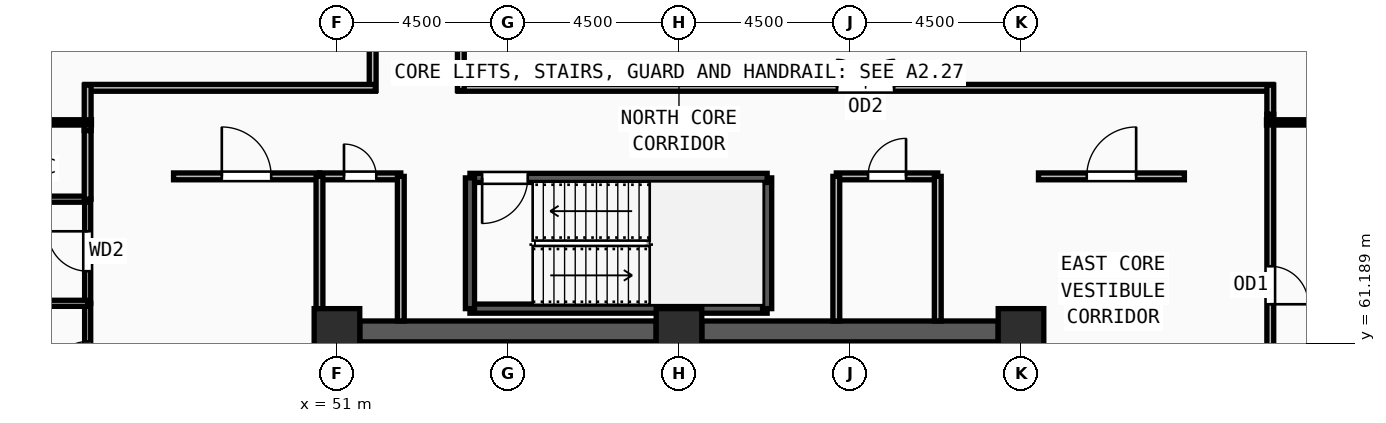
"""IFC4 building model, lengths in metres.
Left out: names, types, materials, properties, quantities, classifications, styles, units other than length and angle.
Written with IfcOpenShell. Run it as: python <this file> out.ifc"""

import sys

from ifc_helpers import new_model, si_unit, direction, frame, frame_2d, origin, origin_2d, place, context, subcontext, project, spatial, rectangle, extrude, source, transform, mapped, element, fill, save


model = new_model("IFC4")
c1 = context("Model", 3, precision=1e-05, world=origin(), true_north=direction((0.0, 1.0)))
c2 = subcontext(c1, "Body", "Model", "MODEL_VIEW")
j1 = project(units=[si_unit("LENGTHUNIT", "METRE"), si_unit("PLANEANGLEUNIT", "RADIAN")], contexts=[c1])
p1 = place(None, origin())
s1 = spatial("IfcSite", under=j1, at=p1, CompositionType="ELEMENT")
p2 = place(p1, origin())
s2 = spatial("IfcBuilding", under=s1, at=p2, CompositionType="ELEMENT")
p3 = place(p2, frame((0.0, 0.0, 309.0)))
s3 = spatial("IfcBuildingStorey", under=s2, at=p3, CompositionType="ELEMENT", Elevation=309.0)
m1 = source(origin(), c2, "Body", "SweptSolid", [
    extrude(rectangle(XDim=1.2, YDim=1.2, at=origin_2d()), origin(), (0.0, 0.0, 1.0), 3.75),
])
for number, where, z_axis, x_axis in (
    (1, (69.0, 61.5, 0.0), (0.0, 0.0, 1.0), (1.0, 0.0, 0.0)),
    (2, (60.0, 61.5, 0.0), (0.0, 0.0, 1.0), (1.0, 0.0, 0.0)),
    (3, (51.0, 61.5, 0.0), (0.0, 0.0, 1.0), (1.0, 0.0, 0.0)),
):
    element("IfcColumn", number, at=place(p3, frame(where, z_axis=z_axis, x_axis=x_axis)), inside=s3, PredefinedType="COLUMN", context=c2, shape_type="MappedRepresentation", body=[
        mapped(m1, transform((0.0, 0.0, 0.0), x_axis=(1.0, 0.0, 0.0), y_axis=(0.0, 1.0, 0.0), z_axis=(0.0, 0.0, 1.0), scale=1.0)),
    ])
for number, where, z_axis, x_axis in (
    (4, (51.6, 61.5, 0.0), (0.0, 0.0, 1.0), (1.0, 0.0, 0.0)),
    (5, (60.6, 61.5, 0.0), (0.0, 0.0, 1.0), (1.0, 0.0, 0.0)),
):
    element("IfcWall", number, at=place(p3, frame(where, z_axis=z_axis, x_axis=x_axis)), inside=s3, PredefinedType="SHEAR", context=c2, shape_type="SweptSolid", body=[
        extrude(rectangle(XDim=7.8, YDim=0.55, at=frame_2d((3.9, 0.0))), origin(), (0.0, 0.0, 1.0), 3.57),
    ])
p4 = place(p3, frame((54.5, 62.1, 0.0), z_axis=(0.0, 0.0, 1.0), x_axis=(1.0, 0.0, 0.0)))
e6 = element("IfcWall", 6, at=p4, inside=s3, PredefinedType="SOLIDWALL", context=c2, shape_type="SweptSolid", body=[
    extrude(rectangle(XDim=7.82, YDim=0.24, at=frame_2d((3.91, 0.0))), origin(), (0.0, 0.0, 1.0), 3.57),
])
p5 = place(p3, frame((62.32, 62.1, 0.0), z_axis=(0.0, 0.0, 1.0), x_axis=(0.0, 1.0, 0.0)))
e7 = element("IfcWall", 7, at=p5, inside=s3, PredefinedType="SOLIDWALL", context=c2, shape_type="SweptSolid", body=[
    extrude(rectangle(XDim=3.44, YDim=0.24, at=frame_2d((1.72, 0.0))), origin(), (0.0, 0.0, 1.0), 3.57),
])
p6 = place(p3, frame((62.32, 65.54, 0.0), z_axis=(0.0, 0.0, 1.0), x_axis=(-1.0, 0.0, 0.0)))
e8 = element("IfcWall", 8, at=p6, inside=s3, PredefinedType="SOLIDWALL", context=c2, shape_type="SweptSolid", body=[
    extrude(rectangle(XDim=7.82, YDim=0.24, at=frame_2d((3.91, 0.0))), origin(), (0.0, 0.0, 1.0), 3.57),
])
m2 = source(origin(), c2, "Body", "SweptSolid", [
    extrude(rectangle(XDim=1.2, YDim=2.2, at=frame_2d((0.6, 1.1))), frame((0.0, 0.13, 0.0), z_axis=(0.0, -1.0, 0.0), x_axis=(1.0, 0.0, 0.0)), (0.0, 0.0, 1.0), 0.26),
])
p7 = place(p6, frame((6.3, 0.0, 0.0)))
e9 = element("IfcOpeningElement", 9, at=p7, cuts=e8, PredefinedType="OPENING", context=c2, shape_type="MappedRepresentation", body=[
    mapped(m2, transform((0.0, 0.0, 0.0), x_axis=(1.0, 0.0, 0.0), y_axis=(0.0, 1.0, 0.0), z_axis=(0.0, 0.0, 1.0), scale=1.0)),
])
p8 = place(p3, frame((54.5, 65.54, 0.0), z_axis=(0.0, 0.0, 1.0), x_axis=(0.0, -1.0, 0.0)))
e10 = element("IfcWall", 10, at=p8, inside=s3, PredefinedType="SOLIDWALL", context=c2, shape_type="SweptSolid", body=[
    extrude(rectangle(XDim=3.44, YDim=0.24, at=frame_2d((1.72, 0.0))), origin(), (0.0, 0.0, 1.0), 3.57),
])
p9 = place(p3, frame((44.44, 59.28, 0.0), z_axis=(0.0, 0.0, 1.0), x_axis=(0.0, 1.0, 0.0)))
e11 = element("IfcWall", 11, at=p9, inside=s3, PredefinedType="PARTITIONING", context=c2, shape_type="SweptSolid", body=[
    extrude(rectangle(XDim=2.96, YDim=0.16, at=frame_2d((1.48, 0.0))), origin(), (0.0, 0.0, 1.0), 3.57),
])
m3 = source(origin(), c2, "Body", "SweptSolid", [
    extrude(rectangle(XDim=0.95, YDim=2.15, at=frame_2d((0.475, 1.075))), frame((0.0, 0.09, 0.0), z_axis=(0.0, -1.0, 0.0), x_axis=(1.0, 0.0, 0.0)), (0.0, 0.0, 1.0), 0.18),
])
p10 = place(p9, frame((1.005, 0.0, 0.0)))
e12 = element("IfcOpeningElement", 12, at=p10, cuts=e11, PredefinedType="OPENING", context=c2, shape_type="MappedRepresentation", body=[
    mapped(m3, transform((0.0, 0.0, 0.0), x_axis=(1.0, 0.0, 0.0), y_axis=(0.0, 1.0, 0.0), z_axis=(0.0, 0.0, 1.0), scale=1.0)),
])
p11 = place(p3, frame((44.44, 62.24, 0.0), z_axis=(0.0, 0.0, 1.0), x_axis=(0.0, 1.0, 0.0)))
e13 = element("IfcWall", 13, at=p11, inside=s3, PredefinedType="PARTITIONING", context=c2, shape_type="SweptSolid", body=[
    extrude(rectangle(XDim=2.74, YDim=0.16, at=frame_2d((1.37, 0.0))), origin(), (0.0, 0.0, 1.0), 3.57),
])
m4 = source(origin(), c2, "Body", "SweptSolid", [
    extrude(rectangle(XDim=1.05, YDim=2.15, at=frame_2d((0.525, 1.075))), frame((0.0, 0.09, 0.0), z_axis=(0.0, -1.0, 0.0), x_axis=(1.0, 0.0, 0.0)), (0.0, 0.0, 1.0), 0.18),
])
p12 = place(p11, frame((0.845, 0.0, 0.0)))
e14 = element("IfcOpeningElement", 14, at=p12, cuts=e13, PredefinedType="OPENING", context=c2, shape_type="MappedRepresentation", body=[
    mapped(m4, transform((0.0, 0.0, 0.0), x_axis=(1.0, 0.0, 0.0), y_axis=(0.0, 1.0, 0.0), z_axis=(0.0, 0.0, 1.0), scale=1.0)),
])
p13 = place(p3, frame((50.54, 65.58, 0.0), z_axis=(0.0, 0.0, 1.0), x_axis=(1.0, 0.0, 0.0)))
e15 = element("IfcWall", 15, at=p13, inside=s3, PredefinedType="PARTITIONING", context=c2, shape_type="SweptSolid", body=[
    extrude(rectangle(XDim=2.14, YDim=0.18, at=frame_2d((1.07, 0.0))), origin(), (0.0, 0.0, 1.0), 3.57),
])
m5 = source(origin(), c2, "Body", "SweptSolid", [
    extrude(rectangle(XDim=0.85, YDim=2.1, at=frame_2d((0.425, 1.05))), frame((0.0, 0.1, 0.0), z_axis=(0.0, -1.0, 0.0), x_axis=(1.0, 0.0, 0.0)), (0.0, 0.0, 1.0), 0.2),
])
p14 = place(p13, frame((0.645, 0.0, 0.0)))
e16 = element("IfcOpeningElement", 16, at=p14, cuts=e15, PredefinedType="OPENING", context=c2, shape_type="MappedRepresentation", body=[
    mapped(m5, transform((0.0, 0.0, 0.0), x_axis=(1.0, 0.0, 0.0), y_axis=(0.0, 1.0, 0.0), z_axis=(0.0, 0.0, 1.0), scale=1.0)),
])
p15 = place(p3, frame((64.14, 65.58, 0.0), z_axis=(0.0, 0.0, 1.0), x_axis=(1.0, 0.0, 0.0)))
e17 = element("IfcWall", 17, at=p15, inside=s3, PredefinedType="PARTITIONING", context=c2, shape_type="SweptSolid", body=[
    extrude(rectangle(XDim=2.67, YDim=0.18, at=frame_2d((1.335, 0.0))), origin(), (0.0, 0.0, 1.0), 3.57),
])
m6 = source(origin(), c2, "Body", "SweptSolid", [
    extrude(rectangle(XDim=1.0, YDim=2.2, at=frame_2d((0.5, 1.1))), frame((0.0, 0.1, 0.0), z_axis=(0.0, -1.0, 0.0), x_axis=(1.0, 0.0, 0.0)), (0.0, 0.0, 1.0), 0.2),
])
p16 = place(p15, frame((0.835, 0.0, 0.0)))
e18 = element("IfcOpeningElement", 18, at=p16, cuts=e17, PredefinedType="OPENING", context=c2, shape_type="MappedRepresentation", body=[
    mapped(m6, transform((0.0, 0.0, 0.0), x_axis=(1.0, 0.0, 0.0), y_axis=(0.0, 1.0, 0.0), z_axis=(0.0, 0.0, 1.0), scale=1.0)),
])
p17 = place(p3, frame((46.7, 65.58, 0.0), z_axis=(0.0, 0.0, 1.0), x_axis=(1.0, 0.0, 0.0)))
e19 = element("IfcWall", 19, at=p17, inside=s3, PredefinedType="PARTITIONING", context=c2, shape_type="SweptSolid", body=[
    extrude(rectangle(XDim=3.84, YDim=0.18, at=frame_2d((1.92, 0.0))), origin(), (0.0, 0.0, 1.0), 3.57),
])
m7 = source(origin(), c2, "Body", "SweptSolid", [
    extrude(rectangle(XDim=1.3, YDim=2.2, at=frame_2d((0.65, 1.1))), frame((0.0, 0.1, 0.0), z_axis=(0.0, -1.0, 0.0), x_axis=(1.0, 0.0, 0.0)), (0.0, 0.0, 1.0), 0.2),
])
p18 = place(p17, frame((1.27, 0.0, 0.0)))
e20 = element("IfcOpeningElement", 20, at=p18, cuts=e19, PredefinedType="OPENING", context=c2, shape_type="MappedRepresentation", body=[
    mapped(m7, transform((0.0, 0.0, 0.0), x_axis=(1.0, 0.0, 0.0), y_axis=(0.0, 1.0, 0.0), z_axis=(0.0, 0.0, 1.0), scale=1.0)),
])
p19 = place(p3, frame((69.46, 65.58, 0.0), z_axis=(0.0, 0.0, 1.0), x_axis=(1.0, 0.0, 0.0)))
e21 = element("IfcWall", 21, at=p19, inside=s3, PredefinedType="PARTITIONING", context=c2, shape_type="SweptSolid", body=[
    extrude(rectangle(XDim=3.84, YDim=0.18, at=frame_2d((1.92, 0.0))), origin(), (0.0, 0.0, 1.0), 3.57),
])
p20 = place(p19, frame((1.27, 0.0, 0.0)))
e22 = element("IfcOpeningElement", 22, at=p20, cuts=e21, PredefinedType="OPENING", context=c2, shape_type="MappedRepresentation", body=[
    mapped(m7, transform((0.0, 0.0, 0.0), x_axis=(1.0, 0.0, 0.0), y_axis=(0.0, 1.0, 0.0), z_axis=(0.0, 0.0, 1.0), scale=1.0)),
])
p21 = place(p3, frame((75.56, 67.215, 0.0), z_axis=(0.0, 0.0, 1.0), x_axis=(0.0, -1.0, 0.0)))
e23 = element("IfcWall", 23, at=p21, inside=s3, PredefinedType="PARTITIONING", context=c2, shape_type="SweptSolid", body=[
    extrude(rectangle(XDim=9.0, YDim=0.18, at=frame_2d((4.5, 0.0))), origin(), (0.0, 0.0, 1.0), 3.57),
])
p22 = place(p21, frame((4.0, 0.0, 0.0)))
e24 = element("IfcOpeningElement", 24, at=p22, cuts=e23, PredefinedType="OPENING", context=c2, shape_type="MappedRepresentation", body=[
    mapped(m6, transform((0.0, 0.0, 0.0), x_axis=(1.0, 0.0, 0.0), y_axis=(0.0, 1.0, 0.0), z_axis=(0.0, 0.0, 1.0), scale=1.0)),
])
p23 = place(p3, frame((54.19, 67.91, 0.0), z_axis=(0.0, 0.0, 1.0), x_axis=(1.0, 0.0, 0.0)))
e25 = element("IfcWall", 25, at=p23, inside=s3, PredefinedType="PARTITIONING", context=c2, shape_type="SweptSolid", body=[
    extrude(rectangle(XDim=21.44, YDim=0.18, at=frame_2d((10.72, 0.0))), origin(), (0.0, 0.0, 1.0), 3.261),
])
m8 = source(origin(), c2, "Body", "SweptSolid", [
    extrude(rectangle(XDim=1.5, YDim=2.2, at=frame_2d((0.75, 1.1))), frame((0.0, 0.1, 0.0), z_axis=(0.0, -1.0, 0.0), x_axis=(1.0, 0.0, 0.0)), (0.0, 0.0, 1.0), 0.2),
])
p24 = place(p23, frame((9.97, 0.0, 0.0)))
e26 = element("IfcOpeningElement", 26, at=p24, cuts=e25, PredefinedType="OPENING", context=c2, shape_type="MappedRepresentation", body=[
    mapped(m8, transform((0.0, 0.0, 0.0), x_axis=(1.0, 0.0, 0.0), y_axis=(0.0, 1.0, 0.0), z_axis=(0.0, 0.0, 1.0), scale=1.0)),
])
p25 = place(p3, frame((51.94, 67.84, 0.0), z_axis=(0.0, 0.0, 1.0), x_axis=(0.0, 1.0, 0.0)))
e27 = element("IfcWall", 27, at=p25, inside=s3, PredefinedType="PARTITIONING", context=c2, shape_type="SweptSolid", body=[
    extrude(rectangle(XDim=7.957, YDim=0.18, at=frame_2d((3.979, 0.0))), origin(), (0.0, 0.0, 1.0), 3.57),
])
p26 = place(p25, frame((3.228, 0.0, 0.0)))
e28 = element("IfcOpeningElement", 28, at=p26, cuts=e27, PredefinedType="OPENING", context=c2, shape_type="MappedRepresentation", body=[
    mapped(m8, transform((0.0, 0.0, 0.0), x_axis=(1.0, 0.0, 0.0), y_axis=(0.0, 1.0, 0.0), z_axis=(0.0, 0.0, 1.0), scale=1.0)),
])
for number, where, z_axis, x_axis in (
    (29, (39.98, 62.24, 0.0), (0.0, 0.0, 1.0), (1.0, 0.0, 0.0)),
    (30, (39.98, 64.98, 0.0), (0.0, 0.0, 1.0), (1.0, 0.0, 0.0)),
):
    element("IfcWall", number, at=place(p3, frame(where, z_axis=z_axis, x_axis=x_axis)), inside=s3, PredefinedType="PARTITIONING", context=c2, shape_type="SweptSolid", body=[
        extrude(rectangle(XDim=4.46, YDim=0.16, at=frame_2d((2.23, 0.0))), origin(), (0.0, 0.0, 1.0), 3.57),
    ])
p27 = place(p3, frame((50.54, 61.95, 0.0), z_axis=(0.0, 0.0, 1.0), x_axis=(0.0, 1.0, 0.0)))
e31 = element("IfcWall", 31, at=p27, inside=s3, PredefinedType="PARTITIONING", context=c2, shape_type="SweptSolid", body=[
    extrude(rectangle(XDim=3.63, YDim=0.18, at=frame_2d((1.815, 0.0))), origin(), (0.0, 0.0, 1.0), 3.57),
])
for number, where, z_axis, x_axis in (
    (32, (52.68, 61.775, 0.0), (0.0, 0.0, 1.0), (0.0, 1.0, 0.0)),
    (33, (64.14, 61.775, 0.0), (0.0, 0.0, 1.0), (0.0, 1.0, 0.0)),
    (34, (66.81, 61.775, 0.0), (0.0, 0.0, 1.0), (0.0, 1.0, 0.0)),
):
    element("IfcWall", number, at=place(p3, frame(where, z_axis=z_axis, x_axis=x_axis)), inside=s3, PredefinedType="PARTITIONING", context=c2, shape_type="SweptSolid", body=[
        extrude(rectangle(XDim=3.805, YDim=0.18, at=frame_2d((1.903, 0.0))), origin(), (0.0, 0.0, 1.0), 3.57),
    ])
p28 = place(p3, frame((54.26, 75.954, 0.0), z_axis=(0.0, 0.0, 1.0), x_axis=(0.0, -1.0, 0.0)))
e35 = element("IfcWall", 35, at=p28, inside=s3, PredefinedType="PARTITIONING", context=c2, shape_type="SweptSolid", body=[
    extrude(rectangle(XDim=8.114, YDim=0.18, at=frame_2d((4.057, 0.0))), origin(), (0.0, 0.0, 1.0), 3.57),
])
p29 = place(p3, frame((75.56, 67.98, 0.0), z_axis=(0.0, 0.0, 1.0), x_axis=(0.0, -1.0, 0.0)))
e36 = element("IfcWall", 36, at=p29, inside=s3, PredefinedType="PARTITIONING", context=c2, shape_type="SweptSolid", body=[
    extrude(rectangle(XDim=0.765, YDim=0.18, at=frame_2d((0.382, 0.0))), origin(), (0.0, 0.0, 1.0), 3.57),
])
p30 = place(p3, frame((44.37, 67.91, 0.0), z_axis=(0.0, 0.0, 1.0), x_axis=(1.0, 0.0, 0.0)))
e37 = element("IfcWall", 37, at=p30, inside=s3, PredefinedType="PARTITIONING", context=c2, shape_type="SweptSolid", body=[
    extrude(rectangle(XDim=7.64, YDim=0.18, at=frame_2d((3.82, 0.0))), origin(), (0.0, 0.0, 1.0), 3.57),
])
p31 = place(p3, frame((44.44, 66.785, 0.0), z_axis=(0.0, 0.0, 1.0), x_axis=(0.0, 1.0, 0.0)))
e38 = element("IfcWall", 38, at=p31, inside=s3, PredefinedType="PARTITIONING", context=c2, shape_type="SweptSolid", body=[
    extrude(rectangle(XDim=1.195, YDim=0.18, at=frame_2d((0.598, 0.0))), origin(), (0.0, 0.0, 1.0), 3.57),
])
p32 = place(p3, frame((44.44, 64.98, 0.0), z_axis=(0.0, 0.0, 1.0), x_axis=(0.0, 1.0, 0.0)))
e39 = element("IfcWall", 39, at=p32, inside=s3, PredefinedType="PARTITIONING", context=c2, shape_type="SweptSolid", body=[
    extrude(rectangle(XDim=1.805, YDim=0.18, at=frame_2d((0.902, 0.0))), origin(), (0.0, 0.0, 1.0), 3.57),
])
for number, where, z_axis, x_axis in (
    (40, (44.54, 67.0, 0.0), (0.0, 0.0, 1.0), (-1.0, 0.0, 0.0)),
    (41, (75.46, 67.0, 0.0), (0.0, 0.0, 1.0), (1.0, 0.0, 0.0)),
):
    element("IfcWall", number, at=place(p3, frame(where, z_axis=z_axis, x_axis=x_axis)), inside=s3, PredefinedType="PARTITIONING", context=c2, shape_type="SweptSolid", body=[
        extrude(rectangle(XDim=14.087, YDim=0.14, at=frame_2d((7.043, 0.0))), origin(), (0.0, 0.0, 1.0), 3.261),
    ])
m9 = source(origin(), c2, "Body", "SweptSolid", [
    extrude(rectangle(XDim=1.2, YDim=2.2, at=frame_2d((0.6, 1.1))), frame((0.0, 0.025, 0.0), z_axis=(0.0, -1.0, 0.0), x_axis=(1.0, 0.0, 0.0)), (0.0, 0.0, 1.0), 0.05),
])
p33 = place(p7, origin())
e42 = element("IfcDoor", 42, at=p33, inside=s3, OperationType="SINGLE_SWING_RIGHT", PredefinedType="DOOR", context=c2, shape_type="MappedRepresentation", body=[
    mapped(m9, transform((0.0, 0.0, 0.0), x_axis=(1.0, 0.0, 0.0), y_axis=(0.0, 1.0, 0.0), z_axis=(0.0, 0.0, 1.0), scale=1.0)),
])
fill(e9, e42)
m10 = source(origin(), c2, "Body", "SweptSolid", [
    extrude(rectangle(XDim=0.95, YDim=2.15, at=frame_2d((0.475, 1.075))), frame((0.0, 0.025, 0.0), z_axis=(0.0, -1.0, 0.0), x_axis=(1.0, 0.0, 0.0)), (0.0, 0.0, 1.0), 0.05),
])
p34 = place(p10, origin())
e43 = element("IfcDoor", 43, at=p34, inside=s3, OperationType="SINGLE_SWING_LEFT", PredefinedType="DOOR", context=c2, shape_type="MappedRepresentation", body=[
    mapped(m10, transform((0.0, 0.0, 0.0), x_axis=(1.0, 0.0, 0.0), y_axis=(0.0, 1.0, 0.0), z_axis=(0.0, 0.0, 1.0), scale=1.0)),
])
fill(e12, e43)
m11 = source(origin(), c2, "Body", "SweptSolid", [
    extrude(rectangle(XDim=1.05, YDim=2.15, at=frame_2d((0.525, 1.075))), frame((0.0, 0.025, 0.0), z_axis=(0.0, -1.0, 0.0), x_axis=(1.0, 0.0, 0.0)), (0.0, 0.0, 1.0), 0.05),
])
p35 = place(p12, origin())
e44 = element("IfcDoor", 44, at=p35, inside=s3, OperationType="SINGLE_SWING_RIGHT", PredefinedType="DOOR", context=c2, shape_type="MappedRepresentation", body=[
    mapped(m11, transform((0.0, 0.0, 0.0), x_axis=(1.0, 0.0, 0.0), y_axis=(0.0, 1.0, 0.0), z_axis=(0.0, 0.0, 1.0), scale=1.0)),
])
fill(e14, e44)
m12 = source(origin(), c2, "Body", "SweptSolid", [
    extrude(rectangle(XDim=0.85, YDim=2.1, at=frame_2d((0.425, 1.05))), frame((0.0, 0.025, 0.0), z_axis=(0.0, -1.0, 0.0), x_axis=(1.0, 0.0, 0.0)), (0.0, 0.0, 1.0), 0.05),
])
p36 = place(p14, origin())
e45 = element("IfcDoor", 45, at=p36, inside=s3, OperationType="SINGLE_SWING_LEFT", PredefinedType="DOOR", context=c2, shape_type="MappedRepresentation", body=[
    mapped(m12, transform((0.0, 0.0, 0.0), x_axis=(1.0, 0.0, 0.0), y_axis=(0.0, 1.0, 0.0), z_axis=(0.0, 0.0, 1.0), scale=1.0)),
])
fill(e16, e45)
m13 = source(origin(), c2, "Body", "SweptSolid", [
    extrude(rectangle(XDim=1.0, YDim=2.2, at=frame_2d((0.5, 1.1))), frame((0.0, 0.025, 0.0), z_axis=(0.0, -1.0, 0.0), x_axis=(1.0, 0.0, 0.0)), (0.0, 0.0, 1.0), 0.05),
])
p37 = place(p16, origin())
e46 = element("IfcDoor", 46, at=p37, inside=s3, OperationType="SINGLE_SWING_RIGHT", PredefinedType="DOOR", context=c2, shape_type="MappedRepresentation", body=[
    mapped(m13, transform((0.0, 0.0, 0.0), x_axis=(1.0, 0.0, 0.0), y_axis=(0.0, 1.0, 0.0), z_axis=(0.0, 0.0, 1.0), scale=1.0)),
])
fill(e18, e46)
m14 = source(origin(), c2, "Body", "SweptSolid", [
    extrude(rectangle(XDim=1.3, YDim=2.2, at=frame_2d((0.65, 1.1))), frame((0.0, 0.025, 0.0), z_axis=(0.0, -1.0, 0.0), x_axis=(1.0, 0.0, 0.0)), (0.0, 0.0, 1.0), 0.05),
])
p38 = place(p18, origin())
e47 = element("IfcDoor", 47, at=p38, inside=s3, OperationType="SINGLE_SWING_LEFT", PredefinedType="DOOR", context=c2, shape_type="MappedRepresentation", body=[
    mapped(m14, transform((0.0, 0.0, 0.0), x_axis=(1.0, 0.0, 0.0), y_axis=(0.0, 1.0, 0.0), z_axis=(0.0, 0.0, 1.0), scale=1.0)),
])
fill(e20, e47)
p39 = place(p20, origin())
e48 = element("IfcDoor", 48, at=p39, inside=s3, OperationType="SINGLE_SWING_RIGHT", PredefinedType="DOOR", context=c2, shape_type="MappedRepresentation", body=[
    mapped(m14, transform((0.0, 0.0, 0.0), x_axis=(1.0, 0.0, 0.0), y_axis=(0.0, 1.0, 0.0), z_axis=(0.0, 0.0, 1.0), scale=1.0)),
])
fill(e22, e48)
p40 = place(p22, origin())
e49 = element("IfcDoor", 49, at=p40, inside=s3, OperationType="SINGLE_SWING_RIGHT", PredefinedType="DOOR", context=c2, shape_type="MappedRepresentation", body=[
    mapped(m13, transform((0.0, 0.0, 0.0), x_axis=(1.0, 0.0, 0.0), y_axis=(0.0, 1.0, 0.0), z_axis=(0.0, 0.0, 1.0), scale=1.0)),
])
fill(e24, e49)
m15 = source(origin(), c2, "Body", "SweptSolid", [
    extrude(rectangle(XDim=1.5, YDim=2.2, at=frame_2d((0.75, 1.1))), frame((0.0, 0.025, 0.0), z_axis=(0.0, -1.0, 0.0), x_axis=(1.0, 0.0, 0.0)), (0.0, 0.0, 1.0), 0.05),
])
p41 = place(p24, origin())
e50 = element("IfcDoor", 50, at=p41, inside=s3, OperationType="DOUBLE_DOOR_SINGLE_SWING", PredefinedType="DOOR", context=c2, shape_type="MappedRepresentation", body=[
    mapped(m15, transform((0.0, 0.0, 0.0), x_axis=(1.0, 0.0, 0.0), y_axis=(0.0, 1.0, 0.0), z_axis=(0.0, 0.0, 1.0), scale=1.0)),
])
fill(e26, e50)
save(model, sys.argv[1])
